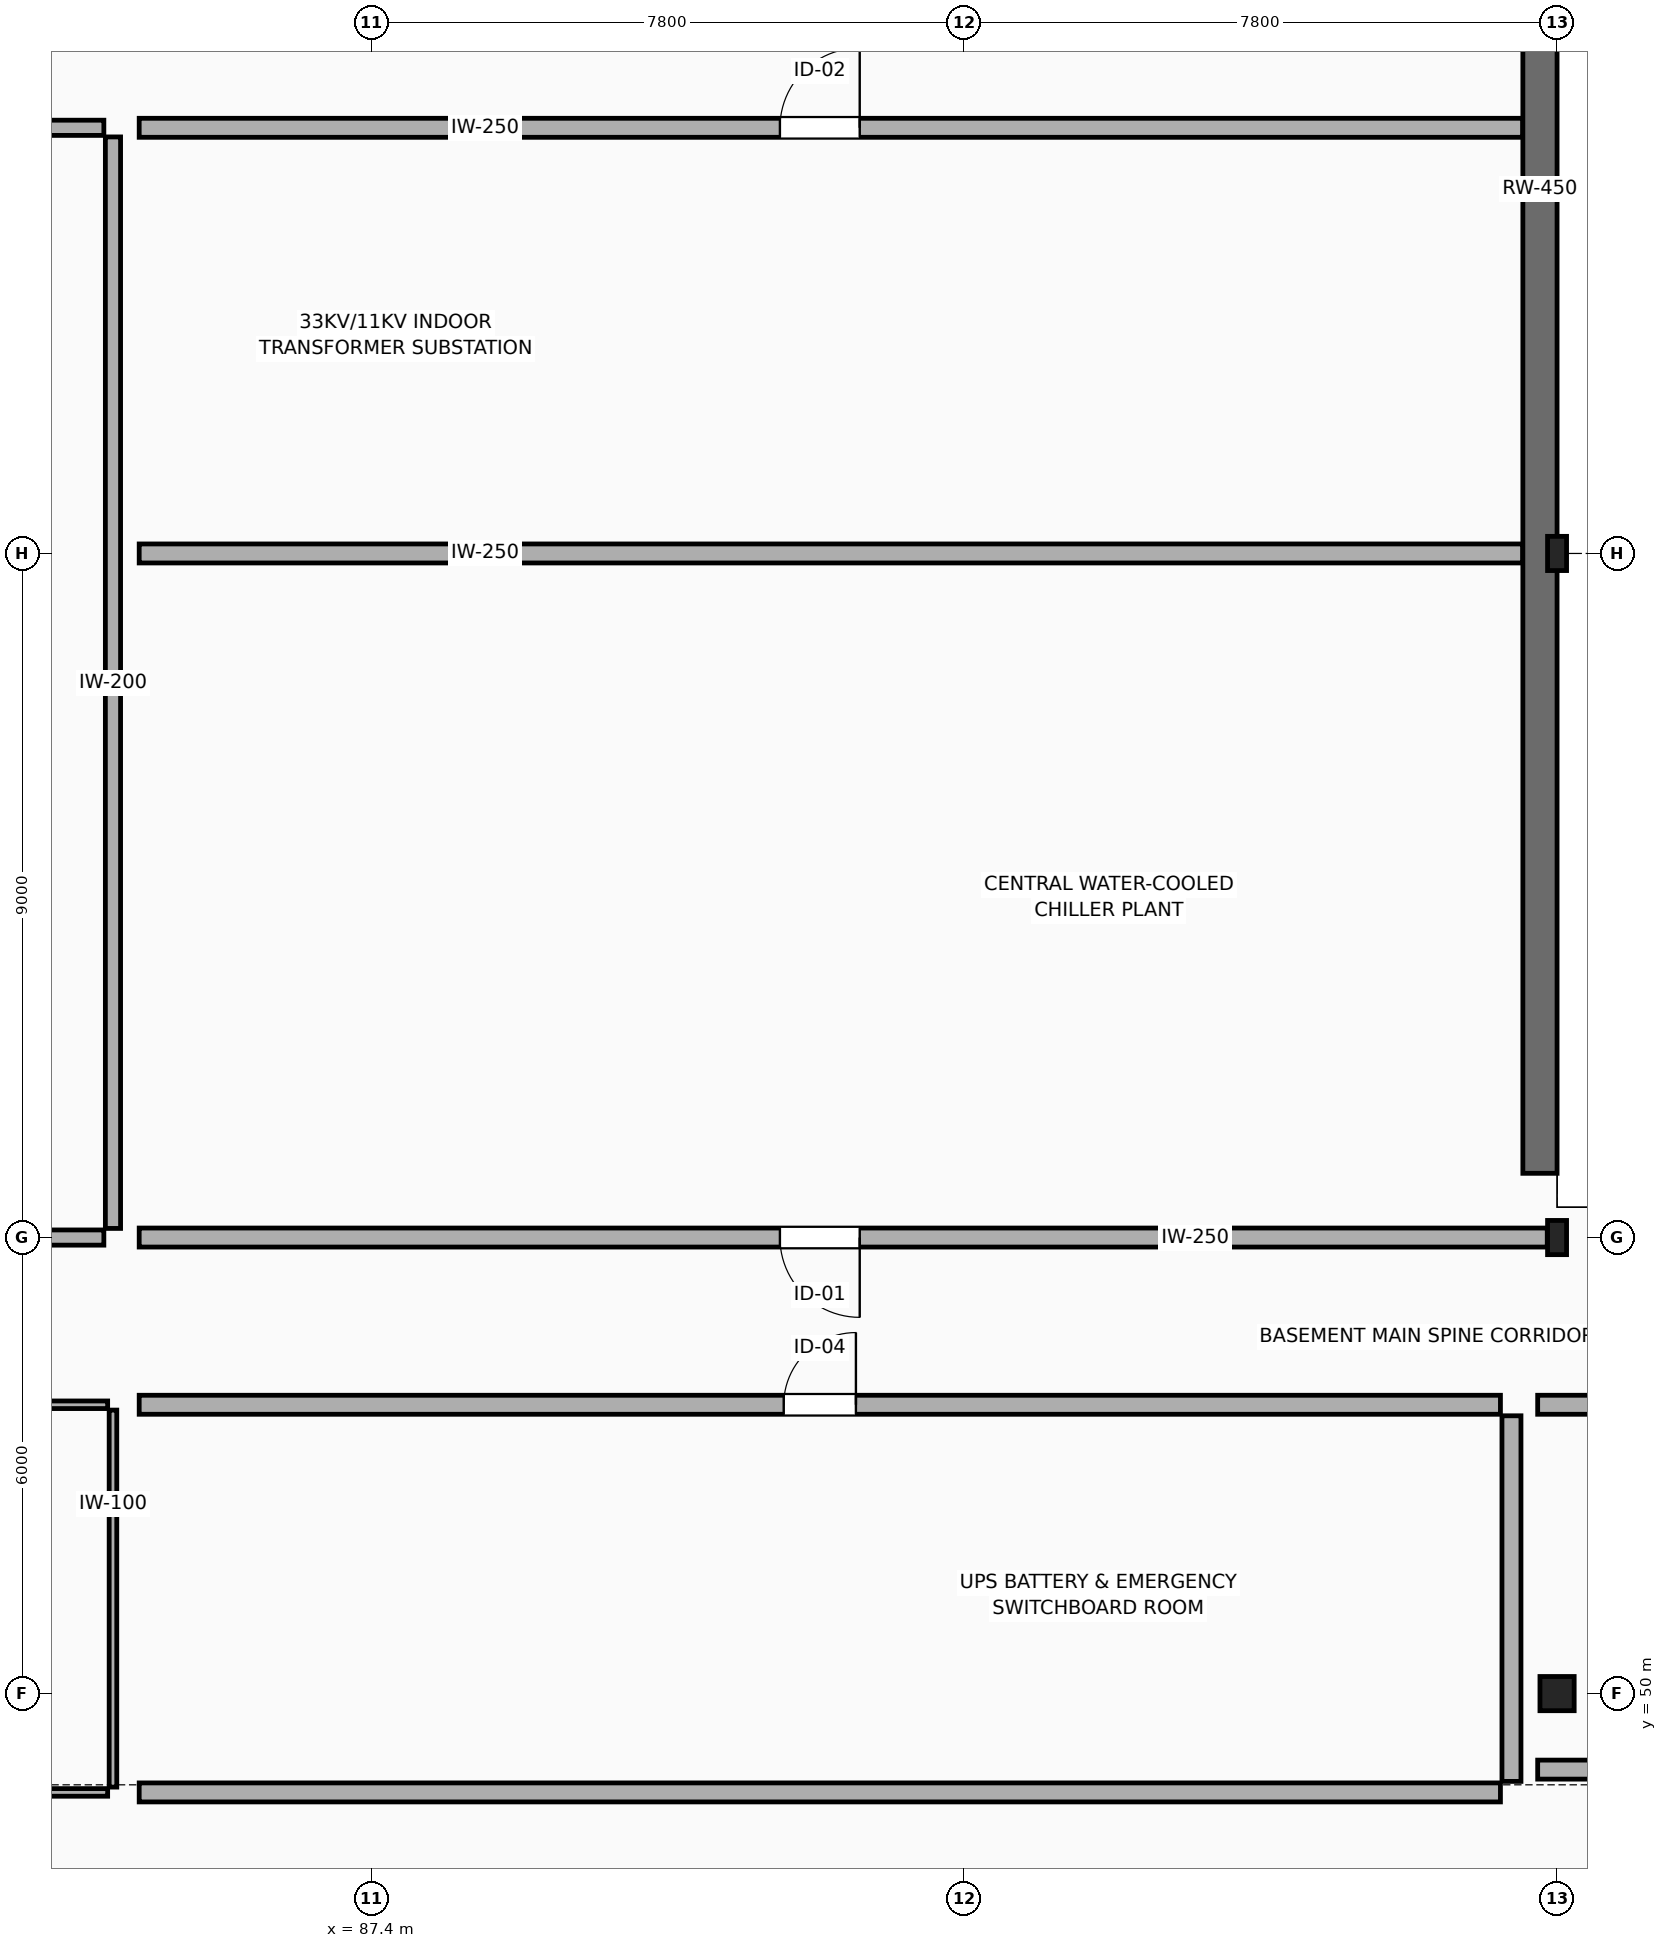
"""IFC4 building model, lengths in metres.
Left out: names, types, materials, properties, quantities, classifications, styles, units other than length and angle.
Written with IfcOpenShell. Run it as: python <this file> out.ifc"""

import sys

from ifc_helpers import new_model, si_unit, direction, frame, frame_2d, origin, origin_2d, place, context, subcontext, project, spatial, rectangle, hollow_rectangle, i_section, extrude, element, fill, save


model = new_model("IFC4")
c1 = context("Model", 3, precision=1e-05, world=origin(), true_north=direction((0.0, 1.0)))
c2 = subcontext(c1, "Body", "Model", "MODEL_VIEW")
j1 = project(units=[si_unit("LENGTHUNIT", "METRE"), si_unit("PLANEANGLEUNIT", "RADIAN")], contexts=[c1])
p1 = place(None, origin())
s1 = spatial("IfcSite", under=j1, at=p1, CompositionType="ELEMENT")
p2 = place(p1, origin())
s2 = spatial("IfcBuilding", under=s1, at=p2, CompositionType="ELEMENT")
p3 = place(p2, frame((0.0, 0.0, -4.8)))
s3 = spatial("IfcBuildingStorey", under=s2, at=p3, CompositionType="ELEMENT", Elevation=-4.8)
p4 = place(p3, frame((103.0, 50.0, 0.0), z_axis=(0.0, 0.0, 1.0), x_axis=(1.0, 0.0, 0.0)))
e1 = element("IfcColumn", 1, at=p4, inside=s3, PredefinedType="COLUMN", context=c2, shape_type="SweptSolid", body=[
    extrude(hollow_rectangle(XDim=0.45, YDim=0.45, WallThickness=0.02, at=origin_2d()), origin(), (0.0, 0.0, 1.0), 4.8),
])
for number, where, z_axis, x_axis in (
    (2, (103.0, 56.0, 0.0), (0.0, 0.0, 1.0), (1.0, 0.0, 0.0)),
    (3, (103.0, 65.0, 0.0), (0.0, 0.0, 1.0), (1.0, 0.0, 0.0)),
):
    element("IfcColumn", number, at=place(p3, frame(where, z_axis=z_axis, x_axis=x_axis)), inside=s3, PredefinedType="COLUMN", context=c2, shape_type="SweptSolid", body=[
        extrude(i_section(OverallWidth=0.25, OverallDepth=0.45, WebThickness=0.011, FlangeThickness=0.014, FilletRadius=0.015, at=origin_2d()), origin(), (0.0, 0.0, 1.0), 4.8),
    ])
p5 = place(p3, frame((102.775, 82.755, 0.0), z_axis=(0.0, 0.0, 1.0), x_axis=(0.0, -1.0, 0.0)))
e4 = element("IfcWall", 4, at=p5, inside=s3, PredefinedType="USERDEFINED", context=c2, shape_type="SweptSolid", body=[
    extrude(rectangle(XDim=25.91, YDim=0.45, at=frame_2d((12.955, 0.0))), origin(), (0.0, 0.0, 1.0), 4.38),
])
p6 = place(p3, frame((64.47, 53.8, 0.0), z_axis=(0.0, 0.0, 1.0), x_axis=(1.0, 0.0, 0.0)))
e5 = element("IfcWall", 5, at=p6, inside=s3, PredefinedType="PARTITIONING", context=c2, shape_type="SweptSolid", body=[
    extrude(rectangle(XDim=19.46, YDim=0.1, at=frame_2d((9.73, 0.0))), origin(), (0.0, 0.0, 1.0), 4.39),
])
p7 = place(p6, frame((9.205, 0.0, 0.0)))
e6 = element("IfcOpeningElement", 6, at=p7, cuts=e5, PredefinedType="OPENING", context=c2, shape_type="SweptSolid", body=[
    extrude(rectangle(XDim=1.05, YDim=2.15, at=frame_2d((0.525, 1.075))), frame((0.0, 0.06, 0.0), z_axis=(0.0, -1.0, 0.0), x_axis=(1.0, 0.0, 0.0)), (0.0, 0.0, 1.0), 0.12),
])
p8 = place(p3, frame((84.0, 53.73, 0.0), z_axis=(0.0, 0.0, 1.0), x_axis=(0.0, -1.0, 0.0)))
e7 = element("IfcWall", 7, at=p8, inside=s3, PredefinedType="PARTITIONING", context=c2, shape_type="SweptSolid", body=[
    extrude(rectangle(XDim=4.96, YDim=0.1, at=frame_2d((2.48, 0.0))), origin(), (0.0, 0.0, 1.0), 4.39),
])
p9 = place(p3, frame((83.93, 48.7, 0.0), z_axis=(0.0, 0.0, 1.0), x_axis=(-1.0, 0.0, 0.0)))
e8 = element("IfcWall", 8, at=p9, inside=s3, PredefinedType="PARTITIONING", context=c2, shape_type="SweptSolid", body=[
    extrude(rectangle(XDim=19.46, YDim=0.1, at=frame_2d((9.73, 0.0))), origin(), (0.0, 0.0, 1.0), 4.39),
])
p10 = place(p3, frame((64.52, 70.6, 0.0), z_axis=(0.0, 0.0, 1.0), x_axis=(1.0, 0.0, 0.0)))
e9 = element("IfcWall", 9, at=p10, inside=s3, PredefinedType="PARTITIONING", context=c2, shape_type="SweptSolid", body=[
    extrude(rectangle(XDim=19.36, YDim=0.2, at=frame_2d((9.68, 0.0))), origin(), (0.0, 0.0, 1.0), 4.39),
])
p11 = place(p10, frame((9.205, 0.0, 0.0)))
e10 = element("IfcOpeningElement", 10, at=p11, cuts=e9, PredefinedType="OPENING", context=c2, shape_type="SweptSolid", body=[
    extrude(rectangle(XDim=0.95, YDim=2.15, at=frame_2d((0.475, 1.075))), frame((0.0, 0.11, 0.0), z_axis=(0.0, -1.0, 0.0), x_axis=(1.0, 0.0, 0.0)), (0.0, 0.0, 1.0), 0.22),
])
p12 = place(p3, frame((84.0, 70.48, 0.0), z_axis=(0.0, 0.0, 1.0), x_axis=(0.0, -1.0, 0.0)))
e11 = element("IfcWall", 11, at=p12, inside=s3, PredefinedType="PARTITIONING", context=c2, shape_type="SweptSolid", body=[
    extrude(rectangle(XDim=14.36, YDim=0.2, at=frame_2d((7.18, 0.0))), origin(), (0.0, 0.0, 1.0), 4.39),
])
p13 = place(p3, frame((83.88, 56.0, 0.0), z_axis=(0.0, 0.0, 1.0), x_axis=(-1.0, 0.0, 0.0)))
e12 = element("IfcWall", 12, at=p13, inside=s3, PredefinedType="PARTITIONING", context=c2, shape_type="SweptSolid", body=[
    extrude(rectangle(XDim=19.751, YDim=0.2, at=frame_2d((9.875, 0.0))), origin(), (0.0, 0.0, 1.0), 3.78),
])
p14 = place(p13, frame((9.205, 0.0, 0.0)))
e13 = element("IfcOpeningElement", 13, at=p14, cuts=e12, PredefinedType="OPENING", context=c2, shape_type="SweptSolid", body=[
    extrude(rectangle(XDim=0.95, YDim=2.15, at=frame_2d((0.475, 1.075))), frame((0.0, 0.11, 0.0), z_axis=(0.0, -1.0, 0.0), x_axis=(1.0, 0.0, 0.0)), (0.0, 0.0, 1.0), 0.22),
])
p15 = place(p3, frame((84.345, 65.0, 0.0), z_axis=(0.0, 0.0, 1.0), x_axis=(1.0, 0.0, 0.0)))
e14 = element("IfcWall", 14, at=p15, inside=s3, PredefinedType="PARTITIONING", context=c2, shape_type="SweptSolid", body=[
    extrude(rectangle(XDim=18.201, YDim=0.25, at=frame_2d((9.101, 0.0))), origin(), (0.0, 0.0, 1.0), 3.78),
])
p16 = place(p3, frame((102.871, 56.0, 0.0), z_axis=(0.0, 0.0, 1.0), x_axis=(-1.0, 0.0, 0.0)))
e15 = element("IfcWall", 15, at=p16, inside=s3, PredefinedType="PARTITIONING", context=c2, shape_type="SweptSolid", body=[
    extrude(rectangle(XDim=18.526, YDim=0.25, at=frame_2d((9.263, 0.0))), origin(), (0.0, 0.0, 1.0), 3.78),
])
p17 = place(p16, frame((9.046, 0.0, 0.0)))
e16 = element("IfcOpeningElement", 16, at=p17, cuts=e15, PredefinedType="OPENING", context=c2, shape_type="SweptSolid", body=[
    extrude(rectangle(XDim=1.05, YDim=2.15, at=frame_2d((0.525, 1.075))), frame((0.0, 0.135, 0.0), z_axis=(0.0, -1.0, 0.0), x_axis=(1.0, 0.0, 0.0)), (0.0, 0.0, 1.0), 0.27),
])
p18 = place(p3, frame((84.345, 70.6, 0.0), z_axis=(0.0, 0.0, 1.0), x_axis=(1.0, 0.0, 0.0)))
e17 = element("IfcWall", 17, at=p18, inside=s3, PredefinedType="PARTITIONING", context=c2, shape_type="SweptSolid", body=[
    extrude(rectangle(XDim=18.201, YDim=0.25, at=frame_2d((9.101, 0.0))), origin(), (0.0, 0.0, 1.0), 4.39),
])
p19 = place(p18, frame((8.43, 0.0, 0.0)))
e18 = element("IfcOpeningElement", 18, at=p19, cuts=e17, PredefinedType="OPENING", context=c2, shape_type="SweptSolid", body=[
    extrude(rectangle(XDim=1.05, YDim=2.15, at=frame_2d((0.525, 1.075))), frame((0.0, 0.135, 0.0), z_axis=(0.0, -1.0, 0.0), x_axis=(1.0, 0.0, 0.0)), (0.0, 0.0, 1.0), 0.27),
])
p20 = place(p3, frame((84.345, 53.8, 0.0), z_axis=(0.0, 0.0, 1.0), x_axis=(1.0, 0.0, 0.0)))
e19 = element("IfcWall", 19, at=p20, inside=s3, PredefinedType="PARTITIONING", context=c2, shape_type="SweptSolid", body=[
    extrude(rectangle(XDim=17.91, YDim=0.25, at=frame_2d((8.955, 0.0))), origin(), (0.0, 0.0, 1.0), 4.39),
])
p21 = place(p20, frame((8.48, 0.0, 0.0)))
e20 = element("IfcOpeningElement", 20, at=p21, cuts=e19, PredefinedType="OPENING", context=c2, shape_type="SweptSolid", body=[
    extrude(rectangle(XDim=0.95, YDim=2.15, at=frame_2d((0.475, 1.075))), frame((0.0, 0.135, 0.0), z_axis=(0.0, -1.0, 0.0), x_axis=(1.0, 0.0, 0.0)), (0.0, 0.0, 1.0), 0.27),
])
p22 = place(p3, frame((102.4, 53.655, 0.0), z_axis=(0.0, 0.0, 1.0), x_axis=(0.0, -1.0, 0.0)))
e21 = element("IfcWall", 21, at=p22, inside=s3, PredefinedType="PARTITIONING", context=c2, shape_type="SweptSolid", body=[
    extrude(rectangle(XDim=4.81, YDim=0.25, at=frame_2d((2.405, 0.0))), origin(), (0.0, 0.0, 1.0), 4.47),
])
p23 = place(p3, frame((102.255, 48.7, 0.0), z_axis=(0.0, 0.0, 1.0), x_axis=(-1.0, 0.0, 0.0)))
e22 = element("IfcWall", 22, at=p23, inside=s3, PredefinedType="PARTITIONING", context=c2, shape_type="SweptSolid", body=[
    extrude(rectangle(XDim=17.91, YDim=0.25, at=frame_2d((8.955, 0.0))), origin(), (0.0, 0.0, 1.0), 4.39),
])
p24 = place(p3, frame((102.745, 53.8, 0.0), z_axis=(0.0, 0.0, 1.0), x_axis=(1.0, 0.0, 0.0)))
e23 = element("IfcWall", 23, at=p24, inside=s3, PredefinedType="PARTITIONING", context=c2, shape_type="SweptSolid", body=[
    extrude(rectangle(XDim=15.71, YDim=0.25, at=frame_2d((7.855, 0.0))), origin(), (0.0, 0.0, 1.0), 4.47),
])
p25 = place(p24, frame((7.33, 0.0, 0.0)))
e24 = element("IfcOpeningElement", 24, at=p25, cuts=e23, PredefinedType="OPENING", context=c2, shape_type="SweptSolid", body=[
    extrude(rectangle(XDim=1.05, YDim=2.15, at=frame_2d((0.525, 1.075))), frame((0.0, 0.135, 0.0), z_axis=(0.0, -1.0, 0.0), x_axis=(1.0, 0.0, 0.0)), (0.0, 0.0, 1.0), 0.27),
])
p26 = place(p3, frame((118.455, 49.0, 0.0), z_axis=(0.0, 0.0, 1.0), x_axis=(-1.0, 0.0, 0.0)))
e25 = element("IfcWall", 25, at=p26, inside=s3, PredefinedType="PARTITIONING", context=c2, shape_type="SweptSolid", body=[
    extrude(rectangle(XDim=15.71, YDim=0.25, at=frame_2d((7.855, 0.0))), origin(), (0.0, 0.0, 1.0), 4.47),
])
p27 = place(p17, origin())
e26 = element("IfcDoor", 26, at=p27, inside=s3, OperationType="SINGLE_SWING_LEFT", PredefinedType="DOOR", context=c2, shape_type="SweptSolid", body=[
    extrude(rectangle(XDim=1.05, YDim=2.15, at=frame_2d((0.525, 1.075))), frame((0.0, 0.025, 0.0), z_axis=(0.0, -1.0, 0.0), x_axis=(1.0, 0.0, 0.0)), (0.0, 0.0, 1.0), 0.05),
])
fill(e16, e26)
p28 = place(p19, origin())
e27 = element("IfcDoor", 27, at=p28, inside=s3, OperationType="SINGLE_SWING_RIGHT", PredefinedType="DOOR", context=c2, shape_type="SweptSolid", body=[
    extrude(rectangle(XDim=1.05, YDim=2.15, at=frame_2d((0.525, 1.075))), frame((0.0, 0.025, 0.0), z_axis=(0.0, -1.0, 0.0), x_axis=(1.0, 0.0, 0.0)), (0.0, 0.0, 1.0), 0.05),
])
fill(e18, e27)
p29 = place(p21, origin())
e28 = element("IfcDoor", 28, at=p29, inside=s3, OperationType="SINGLE_SWING_RIGHT", PredefinedType="DOOR", context=c2, shape_type="SweptSolid", body=[
    extrude(rectangle(XDim=0.95, YDim=2.15, at=frame_2d((0.475, 1.075))), frame((0.0, 0.025, 0.0), z_axis=(0.0, -1.0, 0.0), x_axis=(1.0, 0.0, 0.0)), (0.0, 0.0, 1.0), 0.05),
])
fill(e20, e28)
save(model, sys.argv[1])
